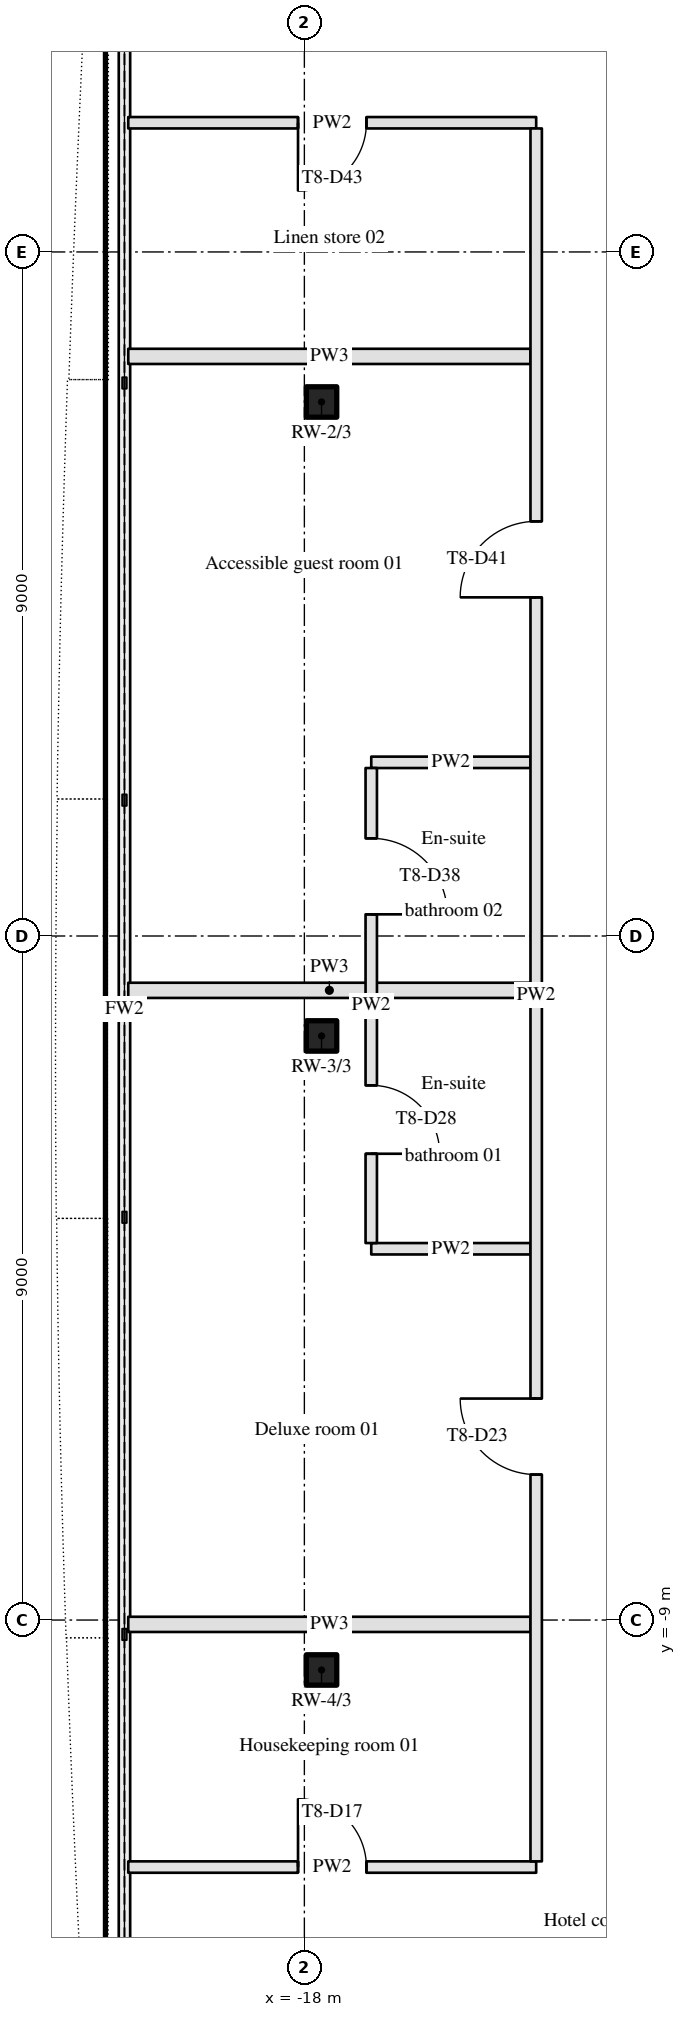
"""IFC4 building model, lengths in metres.
Left out: names, types, materials, properties, quantities, classifications, styles, units other than length and angle.
Written with IfcOpenShell. Run it as: python <this file> out.ifc"""

import sys

from ifc_helpers import new_model, si_unit, direction, frame, frame_2d, origin, origin_2d, place, context, subcontext, project, spatial, rectangle, hollow_rectangle, extrude, element, fill, save


model = new_model("IFC4")
c1 = context("Model", 3, precision=1e-05, world=origin(), true_north=direction((0.0, 1.0)))
c2 = subcontext(c1, "Body", "Model", "MODEL_VIEW")
j1 = project(units=[si_unit("LENGTHUNIT", "METRE"), si_unit("PLANEANGLEUNIT", "RADIAN")], contexts=[c1])
p1 = place(None, origin())
s1 = spatial("IfcSite", under=j1, at=p1, CompositionType="ELEMENT")
p2 = place(p1, origin())
s2 = spatial("IfcBuilding", under=s1, at=p2, CompositionType="ELEMENT")
p3 = place(p2, frame((0.0, 0.0, 121.5)))
s3 = spatial("IfcBuildingStorey", under=s2, at=p3, CompositionType="ELEMENT", Elevation=121.5)
for number, where, z_axis, x_axis in (
    (1, (-17.774, 7.026, 0.0), (0.0, 0.0, 1.0), (1.0, 0.0, 0.0)),
    (2, (-17.774, -1.315, 0.0), (0.0, 0.0, 1.0), (1.0, 0.0, 0.0)),
    (3, (-17.774, -9.657, 0.0), (0.0, 0.0, 1.0), (1.0, 0.0, 0.0)),
):
    element("IfcColumn", number, at=place(p3, frame(where, z_axis=z_axis, x_axis=x_axis)), inside=s3, PredefinedType="COLUMN", context=c2, shape_type="SweptSolid", body=[
        extrude(hollow_rectangle(XDim=0.4, YDim=0.4, WallThickness=0.02, InnerFilletRadius=0.03, OuterFilletRadius=0.05, at=origin_2d()), origin(), (0.0, 0.0, 1.0), 3.4),
    ])
p4 = place(p3, frame((-20.317, -12.25, 0.0), z_axis=(0.0, 0.0, 1.0), x_axis=(1.0, 0.0, 0.0)))
e4 = element("IfcWall", 4, at=p4, inside=s3, PredefinedType="PARTITIONING", context=c2, shape_type="SweptSolid", body=[
    extrude(rectangle(XDim=5.367, YDim=0.15, at=frame_2d((2.684, 0.0))), origin(), (0.0, 0.0, 1.0), 2.46),
])
p5 = place(p4, frame((2.233, 0.0, 0.0)))
e5 = element("IfcOpeningElement", 5, at=p5, cuts=e4, PredefinedType="OPENING", context=c2, shape_type="SweptSolid", body=[
    extrude(rectangle(XDim=0.9, YDim=2.1, at=frame_2d((0.45, 1.05))), frame((0.0, 0.085, 0.0), z_axis=(0.0, -1.0, 0.0), x_axis=(1.0, 0.0, 0.0)), (0.0, 0.0, 1.0), 0.17),
])
p6 = place(p3, frame((-20.317, -9.057, 0.0), z_axis=(0.0, 0.0, 1.0), x_axis=(1.0, 0.0, 0.0)))
e6 = element("IfcWall", 6, at=p6, inside=s3, PredefinedType="PARTITIONING", context=c2, shape_type="SweptSolid", body=[
    extrude(rectangle(XDim=5.292, YDim=0.2, at=frame_2d((2.646, 0.0))), origin(), (0.0, 0.0, 1.0), 2.46),
])
p7 = place(p3, frame((-17.12, -4.115, 0.0), z_axis=(0.0, 0.0, 1.0), x_axis=(1.0, 0.0, 0.0)))
e7 = element("IfcWall", 7, at=p7, inside=s3, PredefinedType="PARTITIONING", context=c2, shape_type="SweptSolid", body=[
    extrude(rectangle(XDim=2.095, YDim=0.15, at=frame_2d((1.048, 0.0))), origin(), (0.0, 0.0, 1.0), 2.46),
])
p8 = place(p3, frame((-20.317, -0.715, 0.0), z_axis=(0.0, 0.0, 1.0), x_axis=(1.0, 0.0, 0.0)))
e8 = element("IfcWall", 8, at=p8, inside=s3, PredefinedType="PARTITIONING", context=c2, shape_type="SweptSolid", body=[
    extrude(rectangle(XDim=5.292, YDim=0.2, at=frame_2d((2.646, 0.0))), origin(), (0.0, 0.0, 1.0), 2.46),
])
p9 = place(p3, frame((-17.12, 2.285, 0.0), z_axis=(0.0, 0.0, 1.0), x_axis=(1.0, 0.0, 0.0)))
e9 = element("IfcWall", 9, at=p9, inside=s3, PredefinedType="PARTITIONING", context=c2, shape_type="SweptSolid", body=[
    extrude(rectangle(XDim=2.095, YDim=0.15, at=frame_2d((1.048, 0.0))), origin(), (0.0, 0.0, 1.0), 2.46),
])
p10 = place(p3, frame((-20.317, 7.626, 0.0), z_axis=(0.0, 0.0, 1.0), x_axis=(1.0, 0.0, 0.0)))
e10 = element("IfcWall", 10, at=p10, inside=s3, PredefinedType="PARTITIONING", context=c2, shape_type="SweptSolid", body=[
    extrude(rectangle(XDim=5.292, YDim=0.2, at=frame_2d((2.646, 0.0))), origin(), (0.0, 0.0, 1.0), 2.46),
])
p11 = place(p3, frame((-14.95, 10.7, 0.0), z_axis=(0.0, 0.0, 1.0), x_axis=(-1.0, 0.0, 0.0)))
e11 = element("IfcWall", 11, at=p11, inside=s3, PredefinedType="PARTITIONING", context=c2, shape_type="SweptSolid", body=[
    extrude(rectangle(XDim=5.367, YDim=0.15, at=frame_2d((2.684, 0.0))), origin(), (0.0, 0.0, 1.0), 2.46),
])
p12 = place(p11, frame((2.233, 0.0, 0.0)))
e12 = element("IfcOpeningElement", 12, at=p12, cuts=e11, PredefinedType="OPENING", context=c2, shape_type="SweptSolid", body=[
    extrude(rectangle(XDim=0.9, YDim=2.1, at=frame_2d((0.45, 1.05))), frame((0.0, 0.085, 0.0), z_axis=(0.0, -1.0, 0.0), x_axis=(1.0, 0.0, 0.0)), (0.0, 0.0, 1.0), 0.17),
])
p13 = place(p3, frame((-17.12, 2.21, 0.0), z_axis=(0.0, 0.0, 1.0), x_axis=(0.0, -1.0, 0.0)))
e13 = element("IfcWall", 13, at=p13, inside=s3, PredefinedType="PARTITIONING", context=c2, shape_type="SweptSolid", body=[
    extrude(rectangle(XDim=6.25, YDim=0.15, at=frame_2d((3.125, 0.0))), origin(), (0.0, 0.0, 1.0), 2.46),
])
p14 = place(p13, frame((4.175, 0.0, 0.0)))
e14 = element("IfcOpeningElement", 14, at=p14, cuts=e13, PredefinedType="OPENING", context=c2, shape_type="SweptSolid", body=[
    extrude(rectangle(XDim=0.9, YDim=2.1, at=frame_2d((0.45, 1.05))), frame((0.0, 0.085, 0.0), z_axis=(0.0, -1.0, 0.0), x_axis=(1.0, 0.0, 0.0)), (0.0, 0.0, 1.0), 0.17),
])
p15 = place(p13, frame((0.925, 0.0, 0.0)))
e15 = element("IfcOpeningElement", 15, at=p15, cuts=e13, PredefinedType="OPENING", context=c2, shape_type="SweptSolid", body=[
    extrude(rectangle(XDim=1.0, YDim=2.1, at=frame_2d((0.5, 1.05))), frame((0.0, 0.085, 0.0), z_axis=(0.0, -1.0, 0.0), x_axis=(1.0, 0.0, 0.0)), (0.0, 0.0, 1.0), 0.17),
])
p16 = place(p3, frame((-14.95, -12.175, 0.0), z_axis=(0.0, 0.0, 1.0), x_axis=(0.0, 1.0, 0.0)))
e16 = element("IfcWall", 16, at=p16, inside=s3, PredefinedType="PARTITIONING", context=c2, shape_type="SweptSolid", body=[
    extrude(rectangle(XDim=22.8, YDim=0.15, at=frame_2d((11.4, 0.0))), origin(), (0.0, 0.0, 1.0), 2.46),
])
p17 = place(p16, frame((5.089, 0.0, 0.0)))
e17 = element("IfcOpeningElement", 17, at=p17, cuts=e16, PredefinedType="OPENING", context=c2, shape_type="SweptSolid", body=[
    extrude(rectangle(XDim=1.0, YDim=2.1, at=frame_2d((0.5, 1.05))), frame((0.0, 0.085, 0.0), z_axis=(0.0, -1.0, 0.0), x_axis=(1.0, 0.0, 0.0)), (0.0, 0.0, 1.0), 0.17),
])
p18 = place(p16, frame((16.631, 0.0, 0.0)))
e18 = element("IfcOpeningElement", 18, at=p18, cuts=e16, PredefinedType="OPENING", context=c2, shape_type="SweptSolid", body=[
    extrude(rectangle(XDim=1.0, YDim=2.1, at=frame_2d((0.5, 1.05))), frame((0.0, 0.085, 0.0), z_axis=(0.0, -1.0, 0.0), x_axis=(1.0, 0.0, 0.0)), (0.0, 0.0, 1.0), 0.17),
])
p19 = place(p5, origin())
e19 = element("IfcDoor", 19, at=p19, inside=s3, OperationType="SINGLE_SWING_LEFT", PredefinedType="DOOR", context=c2, shape_type="SweptSolid", body=[
    extrude(rectangle(XDim=0.9, YDim=2.1, at=frame_2d((0.45, 1.05))), frame((0.0, 0.025, 0.0), z_axis=(0.0, -1.0, 0.0), x_axis=(1.0, 0.0, 0.0)), (0.0, 0.0, 1.0), 0.05),
])
fill(e5, e19)
p20 = place(p17, origin())
e20 = element("IfcDoor", 20, at=p20, inside=s3, OperationType="SINGLE_SWING_RIGHT", PredefinedType="DOOR", context=c2, shape_type="SweptSolid", body=[
    extrude(rectangle(XDim=1.0, YDim=2.1, at=frame_2d((0.5, 1.05))), frame((0.0, 0.025, 0.0), z_axis=(0.0, -1.0, 0.0), x_axis=(1.0, 0.0, 0.0)), (0.0, 0.0, 1.0), 0.05),
])
fill(e17, e20)
p21 = place(p18, origin())
e21 = element("IfcDoor", 21, at=p21, inside=s3, OperationType="SINGLE_SWING_LEFT", PredefinedType="DOOR", context=c2, shape_type="SweptSolid", body=[
    extrude(rectangle(XDim=1.0, YDim=2.1, at=frame_2d((0.5, 1.05))), frame((0.0, 0.025, 0.0), z_axis=(0.0, -1.0, 0.0), x_axis=(1.0, 0.0, 0.0)), (0.0, 0.0, 1.0), 0.05),
])
fill(e18, e21)
p22 = place(p12, origin())
e22 = element("IfcDoor", 22, at=p22, inside=s3, OperationType="SINGLE_SWING_RIGHT", PredefinedType="DOOR", context=c2, shape_type="SweptSolid", body=[
    extrude(rectangle(XDim=0.9, YDim=2.1, at=frame_2d((0.45, 1.05))), frame((0.0, 0.025, 0.0), z_axis=(0.0, -1.0, 0.0), x_axis=(1.0, 0.0, 0.0)), (0.0, 0.0, 1.0), 0.05),
])
fill(e12, e22)
p23 = place(p14, origin())
e23 = element("IfcDoor", 23, at=p23, inside=s3, OperationType="SINGLE_SWING_RIGHT", PredefinedType="DOOR", context=c2, shape_type="SweptSolid", body=[
    extrude(rectangle(XDim=0.9, YDim=2.1, at=frame_2d((0.45, 1.05))), frame((0.0, 0.025, 0.0), z_axis=(0.0, -1.0, 0.0), x_axis=(1.0, 0.0, 0.0)), (0.0, 0.0, 1.0), 0.05),
])
fill(e14, e23)
p24 = place(p15, origin())
e24 = element("IfcDoor", 24, at=p24, inside=s3, OperationType="SINGLE_SWING_RIGHT", PredefinedType="DOOR", context=c2, shape_type="SweptSolid", body=[
    extrude(rectangle(XDim=1.0, YDim=2.1, at=frame_2d((0.5, 1.05))), frame((0.0, 0.025, 0.0), z_axis=(0.0, -1.0, 0.0), x_axis=(1.0, 0.0, 0.0)), (0.0, 0.0, 1.0), 0.05),
])
fill(e15, e24)
save(model, sys.argv[1])
